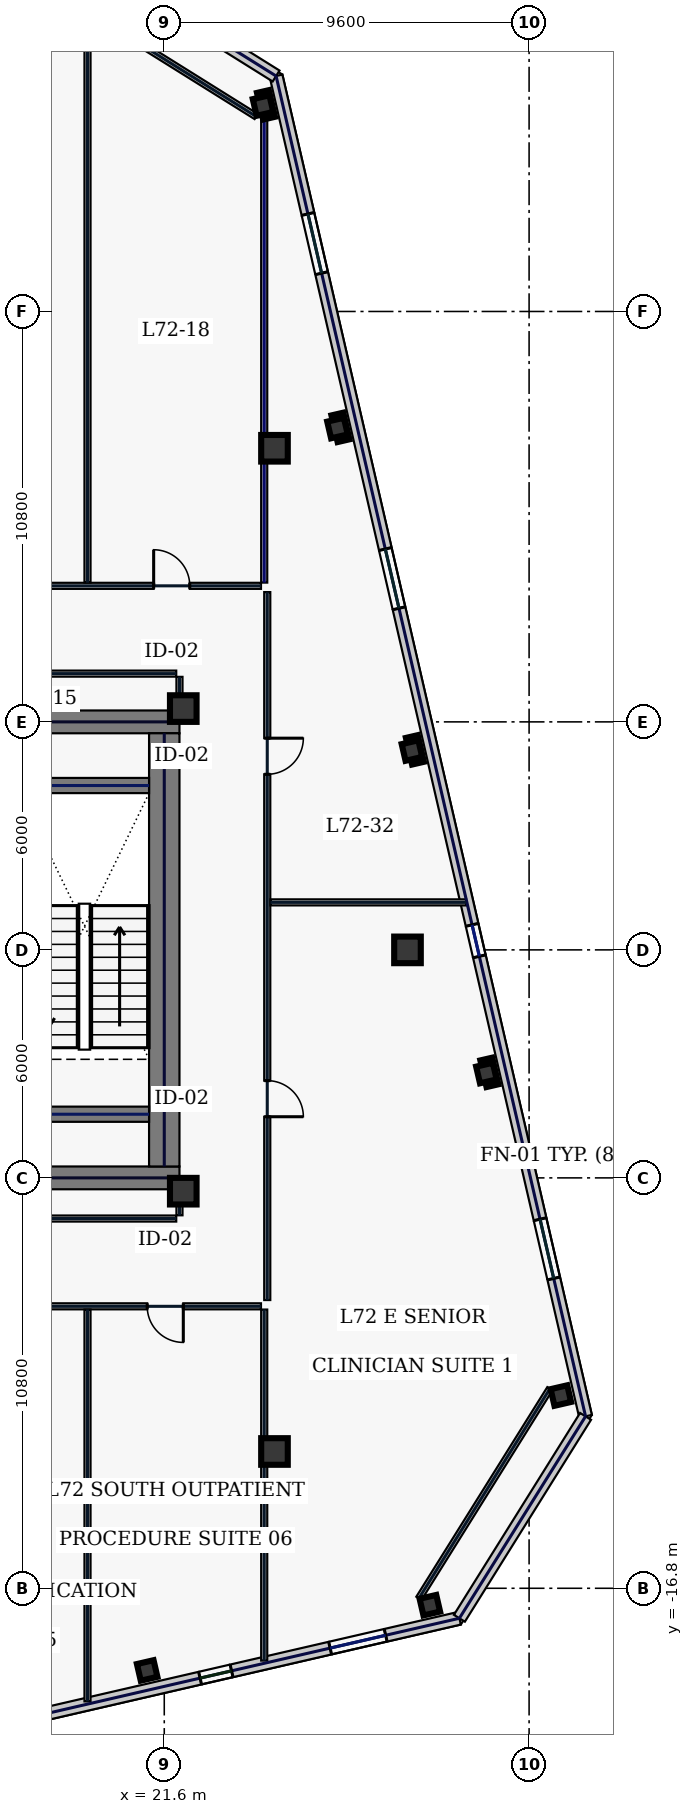
"""IFC4 building model, lengths in metres.
Left out: names, types, materials, properties, quantities, classifications, styles, units other than length and angle.
Written with IfcOpenShell. Run it as: python <this file> out.ifc"""

import sys

from ifc_helpers import new_model, si_unit, direction, frame, frame_2d, origin, origin_2d, place, context, subcontext, project, spatial, rectangle, hollow_rectangle, extrude, element, fill, save


model = new_model("IFC4")
c1 = context("Model", 3, precision=1e-05, world=origin(), true_north=direction((0.0, 1.0)))
c2 = subcontext(c1, "Body", "Model", "MODEL_VIEW")
j1 = project(units=[si_unit("LENGTHUNIT", "METRE"), si_unit("PLANEANGLEUNIT", "RADIAN")], contexts=[c1])
p1 = place(None, origin())
s1 = spatial("IfcSite", under=j1, at=p1, CompositionType="ELEMENT")
p2 = place(p1, origin())
s2 = spatial("IfcBuilding", under=s1, at=p2, CompositionType="ELEMENT")
p3 = place(p2, frame((0.0, 0.0, 309.0)))
s3 = spatial("IfcBuildingStorey", under=s2, at=p3, CompositionType="ELEMENT", Elevation=309.0)
for number, where, z_axis, x_axis in (
    (1, (10.5, 6.0, 0.0), (0.0, 0.0, 1.0), (1.0, 0.0, 0.0)),
    (2, (10.5, -6.0, 0.0), (0.0, 0.0, 1.0), (1.0, 0.0, 0.0)),
):
    element("IfcWall", number, at=place(p3, frame(where, z_axis=z_axis, x_axis=x_axis)), inside=s3, PredefinedType="SHEAR", context=c2, shape_type="SweptSolid", body=[
        extrude(rectangle(XDim=11.5, YDim=0.6, at=frame_2d((5.75, 0.0))), origin(), (0.0, 0.0, 1.0), 3.74),
    ])
p4 = place(p3, frame((21.6, -5.7, 0.0), z_axis=(0.0, 0.0, 1.0), x_axis=(0.0, 1.0, 0.0)))
e3 = element("IfcWall", 3, at=p4, inside=s3, PredefinedType="SHEAR", context=c2, shape_type="SweptSolid", body=[
    extrude(rectangle(XDim=11.4, YDim=0.8, at=frame_2d((5.7, 0.0))), origin(), (0.0, 0.0, 1.0), 3.74),
])
for number, where, z_axis, x_axis in (
    (4, (17.8, -4.325, 0.0), (0.0, 0.0, 1.0), (1.0, 0.0, 0.0)),
    (5, (17.8, 4.325, 0.0), (0.0, 0.0, 1.0), (1.0, 0.0, 0.0)),
):
    element("IfcWall", number, at=place(p3, frame(where, z_axis=z_axis, x_axis=x_axis)), inside=s3, PredefinedType="SHEAR", context=c2, shape_type="SweptSolid", body=[
        extrude(rectangle(XDim=3.4, YDim=0.4, at=frame_2d((1.7, 0.0))), origin(), (0.0, 0.0, 1.0), 3.74),
    ])
for number, where, z_axis, x_axis in (
    (6, (22.1, -6.35, 0.0), (0.0, 0.0, 1.0), (1.0, 0.0, 0.0)),
    (7, (22.1, 6.35, 0.0), (0.0, 0.0, 1.0), (1.0, 0.0, 0.0)),
    (8, (24.5, -13.2, 0.0), (0.0, 0.0, 1.0), (1.0, 0.0, 0.0)),
    (9, (24.5, 13.2, 0.0), (0.0, 0.0, 1.0), (1.0, 0.0, 0.0)),
    (10, (28.0, 0.0, 0.0), (0.0, 0.0, 1.0), (1.0, 0.0, 0.0)),
):
    element("IfcColumn", number, at=place(p3, frame(where, z_axis=z_axis, x_axis=x_axis)), inside=s3, PredefinedType="COLUMN", context=c2, shape_type="SweptSolid", body=[
        extrude(hollow_rectangle(XDim=0.7, YDim=0.7, WallThickness=0.032, at=origin_2d()), origin(), (0.0, 0.0, 1.0), 3.74),
    ])
for number, where, z_axis, x_axis in (
    (11, (21.15, -18.962, 0.0), (0.0, 0.0, 1.0), (0.974, 0.225, 0.0)),
    (12, (28.589, -17.245, 0.0), (0.0, 0.0, 1.0), (0.974, 0.225, 0.0)),
    (13, (32.036, -11.728, 0.0), (0.0, 0.0, 1.0), (0.974, 0.225, 0.0)),
    (14, (30.077, -3.241, 0.0), (0.0, 0.0, 1.0), (0.974, 0.225, 0.0)),
    (15, (28.117, 5.246, 0.0), (0.0, 0.0, 1.0), (0.974, 0.225, 0.0)),
    (16, (26.158, 13.732, 0.0), (0.0, 0.0, 1.0), (0.974, 0.225, 0.0)),
    (17, (24.198, 22.219, 0.0), (0.0, 0.0, 1.0), (0.974, 0.225, 0.0)),
):
    element("IfcColumn", number, at=place(p3, frame(where, z_axis=z_axis, x_axis=x_axis)), inside=s3, PredefinedType="COLUMN", context=c2, shape_type="SweptSolid", body=[
        extrude(hollow_rectangle(XDim=0.45, YDim=0.45, WallThickness=0.022, at=origin_2d()), origin(), (0.0, 0.0, 1.0), 3.74),
    ])
p5 = place(p3, frame((12.445, -21.495, 0.0), z_axis=(0.0, 0.0, 1.0), x_axis=(0.974369392164, 0.224953967767, 0.0)))
e18 = element("IfcWall", 18, at=p5, inside=s3, PredefinedType="STANDARD", context=c2, shape_type="SweptSolid", body=[
    extrude(rectangle(XDim=17.366, YDim=0.34, at=frame_2d((8.683, 0.0))), origin(), (0.0, 0.0, 1.0), 3.74),
])
p6 = place(p5, frame((2.729, 0.0, 0.9)))
e19 = element("IfcOpeningElement", 19, at=p6, cuts=e18, PredefinedType="OPENING", context=c2, shape_type="SweptSolid", body=[
    extrude(rectangle(XDim=1.5, YDim=2.0, at=frame_2d((0.75, 1.0))), frame((0.0, 0.18, 0.0), z_axis=(0.0, -1.0, 0.0), x_axis=(1.0, 0.0, 0.0)), (0.0, 0.0, 1.0), 0.36),
])
p7 = place(p5, frame((10.363, 0.0, 0.9)))
e20 = element("IfcOpeningElement", 20, at=p7, cuts=e18, PredefinedType="OPENING", context=c2, shape_type="SweptSolid", body=[
    extrude(rectangle(XDim=0.85, YDim=1.85, at=frame_2d((0.425, 0.925))), frame((0.0, 0.18, 0.0), z_axis=(0.0, -1.0, 0.0), x_axis=(1.0, 0.0, 0.0)), (0.0, 0.0, 1.0), 0.36),
])
p8 = place(p5, frame((13.875, 0.0, 0.9)))
e21 = element("IfcOpeningElement", 21, at=p8, cuts=e18, PredefinedType="OPENING", context=c2, shape_type="SweptSolid", body=[
    extrude(rectangle(XDim=1.5, YDim=2.0, at=frame_2d((0.75, 1.0))), frame((0.0, 0.18, 0.0), z_axis=(0.0, -1.0, 0.0), x_axis=(1.0, 0.0, 0.0)), (0.0, 0.0, 1.0), 0.36),
])
p9 = place(p3, frame((19.229, 26.316, 0.0), z_axis=(0.0, 0.0, 1.0), x_axis=(-0.974371201193, -0.224946131964, 0.0)))
e22 = element("IfcWall", 22, at=p9, inside=s3, PredefinedType="STANDARD", context=c2, shape_type="SweptSolid", body=[
    extrude(rectangle(XDim=12.35, YDim=0.34, at=frame_2d((6.175, 0.0))), origin(), (0.0, 0.0, 1.0), 3.74),
])
p10 = place(p9, frame((5.553, 0.0, 1.0)))
e23 = element("IfcOpeningElement", 23, at=p10, cuts=e22, PredefinedType="OPENING", context=c2, shape_type="SweptSolid", body=[
    extrude(rectangle(XDim=1.4, YDim=1.85, at=frame_2d((0.7, 0.925))), frame((0.0, 0.18, 0.0), z_axis=(0.0, -1.0, 0.0), x_axis=(1.0, 0.0, 0.0)), (0.0, 0.0, 1.0), 0.36),
])
p11 = place(p9, frame((2.041, 0.0, 1.0)))
e24 = element("IfcOpeningElement", 24, at=p11, cuts=e22, PredefinedType="OPENING", context=c2, shape_type="SweptSolid", body=[
    extrude(rectangle(XDim=0.85, YDim=1.85, at=frame_2d((0.425, 0.925))), frame((0.0, 0.18, 0.0), z_axis=(0.0, -1.0, 0.0), x_axis=(1.0, 0.0, 0.0)), (0.0, 0.0, 1.0), 0.36),
])
p12 = place(p3, frame((32.686, -12.276, 0.0), z_axis=(0.0, 0.0, 1.0), x_axis=(-0.224953091034, 0.974369594576, 0.0)))
e25 = element("IfcWall", 25, at=p12, inside=s3, PredefinedType="STANDARD", context=c2, shape_type="SweptSolid", body=[
    extrude(rectangle(XDim=36.2, YDim=0.34, at=frame_2d((18.1, 0.0))), origin(), (0.0, 0.0, 1.0), 3.74),
])
p13 = place(p12, frame((3.725, 0.0, 0.58)))
e26 = element("IfcOpeningElement", 26, at=p13, cuts=e25, PredefinedType="OPENING", context=c2, shape_type="SweptSolid", body=[
    extrude(rectangle(XDim=1.6, YDim=2.3, at=frame_2d((0.8, 1.15))), frame((0.0, 0.18, 0.0), z_axis=(0.0, -1.0, 0.0), x_axis=(1.0, 0.0, 0.0)), (0.0, 0.0, 1.0), 0.36),
])
p14 = place(p12, frame((12.425, 0.0, 0.75)))
e27 = element("IfcOpeningElement", 27, at=p14, cuts=e25, PredefinedType="OPENING", context=c2, shape_type="SweptSolid", body=[
    extrude(rectangle(XDim=0.85, YDim=1.85, at=frame_2d((0.425, 0.925))), frame((0.0, 0.18, 0.0), z_axis=(0.0, -1.0, 0.0), x_axis=(1.0, 0.0, 0.0)), (0.0, 0.0, 1.0), 0.36),
])
p15 = place(p12, frame((21.825, 0.0, 0.58)))
e28 = element("IfcOpeningElement", 28, at=p15, cuts=e25, PredefinedType="OPENING", context=c2, shape_type="SweptSolid", body=[
    extrude(rectangle(XDim=1.6, YDim=2.3, at=frame_2d((0.8, 1.15))), frame((0.0, 0.18, 0.0), z_axis=(0.0, -1.0, 0.0), x_axis=(1.0, 0.0, 0.0)), (0.0, 0.0, 1.0), 0.36),
])
p16 = place(p12, frame((30.875, 0.0, 0.58)))
e29 = element("IfcOpeningElement", 29, at=p16, cuts=e25, PredefinedType="OPENING", context=c2, shape_type="SweptSolid", body=[
    extrude(rectangle(XDim=1.6, YDim=2.3, at=frame_2d((0.8, 1.15))), frame((0.0, 0.18, 0.0), z_axis=(0.0, -1.0, 0.0), x_axis=(1.0, 0.0, 0.0)), (0.0, 0.0, 1.0), 0.36),
])
for number, where, z_axis, x_axis in (
    (30, (29.366, -17.589, 0.0), (0.0, 0.0, 1.0), (0.53, 0.848, 0.0)),
    (31, (24.542, 22.996, 0.0), (0.0, 0.0, 1.0), (-0.848, 0.53, 0.0)),
):
    element("IfcWall", number, at=place(p3, frame(where, z_axis=z_axis, x_axis=x_axis)), inside=s3, PredefinedType="STANDARD", context=c2, shape_type="SweptSolid", body=[
        extrude(rectangle(XDim=6.265, YDim=0.34, at=frame_2d((3.132, 0.0))), origin(), (0.0, 0.0, 1.0), 3.74),
    ])
for number, where, z_axis, x_axis in (
    (32, (28.3, -17.065, 0.0), (0.0, 0.0, 1.0), (0.53, 0.848, 0.0)),
    (33, (24.018, 21.931, 0.0), (0.0, 0.0, 1.0), (-0.848, 0.53, 0.0)),
):
    element("IfcWall", number, at=place(p3, frame(where, z_axis=z_axis, x_axis=x_axis)), inside=s3, PredefinedType="PARTITIONING", context=c2, shape_type="SweptSolid", body=[
        extrude(rectangle(XDim=6.505, YDim=0.16, at=frame_2d((3.253, 0.0))), origin(), (0.0, 0.0, 1.0), 3.74),
    ])
p17 = place(p3, frame((-24.145, 9.58, 0.0), z_axis=(0.0, 0.0, 1.0), x_axis=(1.0, 0.0, 0.0)))
e34 = element("IfcWall", 34, at=p17, inside=s3, PredefinedType="PARTITIONING", context=c2, shape_type="SweptSolid", body=[
    extrude(rectangle(XDim=48.29, YDim=0.16, at=frame_2d((24.145, 0.0))), origin(), (0.0, 0.0, 1.0), 3.74),
])
p18 = place(p17, frame((2.044, 0.0, 0.0)))
e35 = element("IfcOpeningElement", 35, at=p18, cuts=e34, PredefinedType="OPENING", context=c2, shape_type="SweptSolid", body=[
    extrude(rectangle(XDim=0.95, YDim=2.2, at=frame_2d((0.475, 1.1))), frame((0.0, 0.09, 0.0), z_axis=(0.0, -1.0, 0.0), x_axis=(1.0, 0.0, 0.0)), (0.0, 0.0, 1.0), 0.18),
])
p19 = place(p17, frame((10.39, 0.0, 0.0)))
e36 = element("IfcOpeningElement", 36, at=p19, cuts=e34, PredefinedType="OPENING", context=c2, shape_type="SweptSolid", body=[
    extrude(rectangle(XDim=1.45, YDim=2.2, at=frame_2d((0.725, 1.1))), frame((0.0, 0.09, 0.0), z_axis=(0.0, -1.0, 0.0), x_axis=(1.0, 0.0, 0.0)), (0.0, 0.0, 1.0), 0.18),
])
p20 = place(p17, frame((21.2, 0.0, 0.0)))
e37 = element("IfcOpeningElement", 37, at=p20, cuts=e34, PredefinedType="OPENING", context=c2, shape_type="SweptSolid", body=[
    extrude(rectangle(XDim=1.05, YDim=2.2, at=frame_2d((0.525, 1.1))), frame((0.0, 0.09, 0.0), z_axis=(0.0, -1.0, 0.0), x_axis=(1.0, 0.0, 0.0)), (0.0, 0.0, 1.0), 0.18),
])
p21 = place(p17, frame((29.785, 0.0, 0.0)))
e38 = element("IfcOpeningElement", 38, at=p21, cuts=e34, PredefinedType="OPENING", context=c2, shape_type="SweptSolid", body=[
    extrude(rectangle(XDim=1.3, YDim=2.2, at=frame_2d((0.65, 1.1))), frame((0.0, 0.09, 0.0), z_axis=(0.0, -1.0, 0.0), x_axis=(1.0, 0.0, 0.0)), (0.0, 0.0, 1.0), 0.18),
])
p22 = place(p17, frame((35.92, 0.0, 0.0)))
e39 = element("IfcOpeningElement", 39, at=p22, cuts=e34, PredefinedType="OPENING", context=c2, shape_type="SweptSolid", body=[
    extrude(rectangle(XDim=0.95, YDim=2.2, at=frame_2d((0.475, 1.1))), frame((0.0, 0.09, 0.0), z_axis=(0.0, -1.0, 0.0), x_axis=(1.0, 0.0, 0.0)), (0.0, 0.0, 1.0), 0.18),
])
p23 = place(p17, frame((41.31, 0.0, 0.0)))
e40 = element("IfcOpeningElement", 40, at=p23, cuts=e34, PredefinedType="OPENING", context=c2, shape_type="SweptSolid", body=[
    extrude(rectangle(XDim=0.95, YDim=2.2, at=frame_2d((0.475, 1.1))), frame((0.0, 0.09, 0.0), z_axis=(0.0, -1.0, 0.0), x_axis=(1.0, 0.0, 0.0)), (0.0, 0.0, 1.0), 0.18),
])
p24 = place(p17, frame((45.466, 0.0, 0.0)))
e41 = element("IfcOpeningElement", 41, at=p24, cuts=e34, PredefinedType="OPENING", context=c2, shape_type="SweptSolid", body=[
    extrude(rectangle(XDim=0.95, YDim=2.2, at=frame_2d((0.475, 1.1))), frame((0.0, 0.09, 0.0), z_axis=(0.0, -1.0, 0.0), x_axis=(1.0, 0.0, 0.0)), (0.0, 0.0, 1.0), 0.18),
])
p25 = place(p3, frame((24.31, 9.415, 0.0), z_axis=(0.0, 0.0, 1.0), x_axis=(0.0, -1.0, 0.0)))
e42 = element("IfcWall", 42, at=p25, inside=s3, PredefinedType="PARTITIONING", context=c2, shape_type="SweptSolid", body=[
    extrude(rectangle(XDim=18.63, YDim=0.16, at=frame_2d((9.315, 0.0))), origin(), (0.0, 0.0, 1.0), 3.74),
])
p26 = place(p25, frame((12.856, 0.0, 0.0)))
e43 = element("IfcOpeningElement", 43, at=p26, cuts=e42, PredefinedType="OPENING", context=c2, shape_type="SweptSolid", body=[
    extrude(rectangle(XDim=0.95, YDim=2.2, at=frame_2d((0.475, 1.1))), frame((0.0, 0.09, 0.0), z_axis=(0.0, -1.0, 0.0), x_axis=(1.0, 0.0, 0.0)), (0.0, 0.0, 1.0), 0.18),
])
p27 = place(p25, frame((3.844, 0.0, 0.0)))
e44 = element("IfcOpeningElement", 44, at=p27, cuts=e42, PredefinedType="OPENING", context=c2, shape_type="SweptSolid", body=[
    extrude(rectangle(XDim=0.95, YDim=2.2, at=frame_2d((0.475, 1.1))), frame((0.0, 0.09, 0.0), z_axis=(0.0, -1.0, 0.0), x_axis=(1.0, 0.0, 0.0)), (0.0, 0.0, 1.0), 0.18),
])
p28 = place(p3, frame((24.145, -9.38, 0.0), z_axis=(0.0, 0.0, 1.0), x_axis=(-1.0, 0.0, 0.0)))
e45 = element("IfcWall", 45, at=p28, inside=s3, PredefinedType="PARTITIONING", context=c2, shape_type="SweptSolid", body=[
    extrude(rectangle(XDim=9.08, YDim=0.16, at=frame_2d((4.54, 0.0))), origin(), (0.0, 0.0, 1.0), 3.74),
])
p29 = place(p28, frame((2.044, 0.0, 0.0)))
e46 = element("IfcOpeningElement", 46, at=p29, cuts=e45, PredefinedType="OPENING", context=c2, shape_type="SweptSolid", body=[
    extrude(rectangle(XDim=0.95, YDim=2.2, at=frame_2d((0.475, 1.1))), frame((0.0, 0.09, 0.0), z_axis=(0.0, -1.0, 0.0), x_axis=(1.0, 0.0, 0.0)), (0.0, 0.0, 1.0), 0.18),
])
for number, where, z_axis, x_axis in (
    (47, (21.915, 7.27, 0.0), (0.0, 0.0, 1.0), (-1.0, 0.0, 0.0)),
    (48, (10.715, -7.07, 0.0), (0.0, 0.0, 1.0), (1.0, 0.0, 0.0)),
):
    element("IfcWall", number, at=place(p3, frame(where, z_axis=z_axis, x_axis=x_axis)), inside=s3, PredefinedType="PARTITIONING", context=c2, shape_type="SweptSolid", body=[
        extrude(rectangle(XDim=11.2, YDim=0.16, at=frame_2d((5.6, 0.0))), origin(), (0.0, 0.0, 1.0), 3.74),
    ])
p30 = place(p3, frame((22.0, -6.985, 0.0), z_axis=(0.0, 0.0, 1.0), x_axis=(0.0, 1.0, 0.0)))
e49 = element("IfcWall", 49, at=p30, inside=s3, PredefinedType="PARTITIONING", context=c2, shape_type="SweptSolid", body=[
    extrude(rectangle(XDim=0.565, YDim=0.16, at=frame_2d((0.283, 0.0))), origin(), (0.0, 0.0, 1.0), 3.74),
])
p31 = place(p3, frame((22.0, 6.42, 0.0), z_axis=(0.0, 0.0, 1.0), x_axis=(0.0, 1.0, 0.0)))
e50 = element("IfcWall", 50, at=p31, inside=s3, PredefinedType="PARTITIONING", context=c2, shape_type="SweptSolid", body=[
    extrude(rectangle(XDim=0.765, YDim=0.16, at=frame_2d((0.383, 0.0))), origin(), (0.0, 0.0, 1.0), 3.74),
])
p32 = place(p3, frame((24.23, 9.665, 0.0), z_axis=(0.0, 0.0, 1.0), x_axis=(0.0, 1.0, 0.0)))
e51 = element("IfcWall", 51, at=p32, inside=s3, PredefinedType="PARTITIONING", context=c2, shape_type="SweptSolid", body=[
    extrude(rectangle(XDim=12.906, YDim=0.16, at=frame_2d((6.453, 0.0))), origin(), (0.0, 0.0, 1.0), 3.185),
])
p33 = place(p3, frame((24.23, -18.703, 0.0), z_axis=(0.0, 0.0, 1.0), x_axis=(0.0, 1.0, 0.0)))
e52 = element("IfcWall", 52, at=p33, inside=s3, PredefinedType="PARTITIONING", context=c2, shape_type="SweptSolid", body=[
    extrude(rectangle(XDim=9.238, YDim=0.16, at=frame_2d((4.619, 0.0))), origin(), (0.0, 0.0, 1.0), 3.74),
])
p34 = place(p3, frame((19.58, 9.665, 0.0), z_axis=(0.0, 0.0, 1.0), x_axis=(0.0, 1.0, 0.0)))
e53 = element("IfcWall", 53, at=p34, inside=s3, PredefinedType="PARTITIONING", context=c2, shape_type="SweptSolid", body=[
    extrude(rectangle(XDim=15.048, YDim=0.16, at=frame_2d((7.524, 0.0))), origin(), (0.0, 0.0, 1.0), 3.74),
])
p35 = place(p3, frame((19.58, -19.776, 0.0), z_axis=(0.0, 0.0, 1.0), x_axis=(0.0, 1.0, 0.0)))
e54 = element("IfcWall", 54, at=p35, inside=s3, PredefinedType="PARTITIONING", context=c2, shape_type="SweptSolid", body=[
    extrude(rectangle(XDim=10.311, YDim=0.16, at=frame_2d((5.156, 0.0))), origin(), (0.0, 0.0, 1.0), 3.74),
])
p36 = place(p3, frame((24.395, 1.25, 0.0), z_axis=(0.0, 0.0, 1.0), x_axis=(1.0, 0.0, 0.0)))
e55 = element("IfcWall", 55, at=p36, inside=s3, PredefinedType="PARTITIONING", context=c2, shape_type="SweptSolid", body=[
    extrude(rectangle(XDim=5.147, YDim=0.16, at=frame_2d((2.574, 0.0))), origin(), (0.0, 0.0, 1.0), 3.74),
])
p37 = place(p7, origin())
e56 = element("IfcWindow", 56, at=p37, inside=s3, PartitioningType="SINGLE_PANEL", PredefinedType="WINDOW", context=c2, shape_type="SweptSolid", body=[
    extrude(rectangle(XDim=0.85, YDim=1.85, at=frame_2d((0.425, 0.925))), frame((0.0, 0.03, 0.0), z_axis=(0.0, -1.0, 0.0), x_axis=(1.0, 0.0, 0.0)), (0.0, 0.0, 1.0), 0.06),
])
fill(e20, e56)
p38 = place(p8, origin())
e57 = element("IfcWindow", 57, at=p38, inside=s3, PartitioningType="SINGLE_PANEL", PredefinedType="WINDOW", context=c2, shape_type="SweptSolid", body=[
    extrude(rectangle(XDim=1.5, YDim=2.0, at=frame_2d((0.75, 1.0))), frame((0.0, 0.03, 0.0), z_axis=(0.0, -1.0, 0.0), x_axis=(1.0, 0.0, 0.0)), (0.0, 0.0, 1.0), 0.06),
])
fill(e21, e57)
p39 = place(p13, origin())
e58 = element("IfcWindow", 58, at=p39, inside=s3, PartitioningType="SINGLE_PANEL", PredefinedType="WINDOW", context=c2, shape_type="SweptSolid", body=[
    extrude(rectangle(XDim=1.6, YDim=2.3, at=frame_2d((0.8, 1.15))), frame((0.0, 0.03, 0.0), z_axis=(0.0, -1.0, 0.0), x_axis=(1.0, 0.0, 0.0)), (0.0, 0.0, 1.0), 0.06),
])
fill(e26, e58)
p40 = place(p14, origin())
e59 = element("IfcWindow", 59, at=p40, inside=s3, PartitioningType="SINGLE_PANEL", PredefinedType="WINDOW", context=c2, shape_type="SweptSolid", body=[
    extrude(rectangle(XDim=0.85, YDim=1.85, at=frame_2d((0.425, 0.925))), frame((0.0, 0.03, 0.0), z_axis=(0.0, -1.0, 0.0), x_axis=(1.0, 0.0, 0.0)), (0.0, 0.0, 1.0), 0.06),
])
fill(e27, e59)
p41 = place(p15, origin())
e60 = element("IfcWindow", 60, at=p41, inside=s3, PartitioningType="SINGLE_PANEL", PredefinedType="WINDOW", context=c2, shape_type="SweptSolid", body=[
    extrude(rectangle(XDim=1.6, YDim=2.3, at=frame_2d((0.8, 1.15))), frame((0.0, 0.03, 0.0), z_axis=(0.0, -1.0, 0.0), x_axis=(1.0, 0.0, 0.0)), (0.0, 0.0, 1.0), 0.06),
])
fill(e28, e60)
p42 = place(p16, origin())
e61 = element("IfcWindow", 61, at=p42, inside=s3, PartitioningType="SINGLE_PANEL", PredefinedType="WINDOW", context=c2, shape_type="SweptSolid", body=[
    extrude(rectangle(XDim=1.6, YDim=2.3, at=frame_2d((0.8, 1.15))), frame((0.0, 0.03, 0.0), z_axis=(0.0, -1.0, 0.0), x_axis=(1.0, 0.0, 0.0)), (0.0, 0.0, 1.0), 0.06),
])
fill(e29, e61)
p43 = place(p24, origin())
e62 = element("IfcDoor", 62, at=p43, inside=s3, OperationType="SINGLE_SWING_LEFT", PredefinedType="DOOR", context=c2, shape_type="SweptSolid", body=[
    extrude(rectangle(XDim=0.95, YDim=2.2, at=frame_2d((0.475, 1.1))), frame((0.0, 0.025, 0.0), z_axis=(0.0, -1.0, 0.0), x_axis=(1.0, 0.0, 0.0)), (0.0, 0.0, 1.0), 0.05),
])
fill(e41, e62)
p44 = place(p29, origin())
e63 = element("IfcDoor", 63, at=p44, inside=s3, OperationType="SINGLE_SWING_LEFT", PredefinedType="DOOR", context=c2, shape_type="SweptSolid", body=[
    extrude(rectangle(XDim=0.95, YDim=2.2, at=frame_2d((0.475, 1.1))), frame((0.0, 0.025, 0.0), z_axis=(0.0, -1.0, 0.0), x_axis=(1.0, 0.0, 0.0)), (0.0, 0.0, 1.0), 0.05),
])
fill(e46, e63)
p45 = place(p26, origin())
e64 = element("IfcDoor", 64, at=p45, inside=s3, OperationType="SINGLE_SWING_RIGHT", PredefinedType="DOOR", context=c2, shape_type="SweptSolid", body=[
    extrude(rectangle(XDim=0.95, YDim=2.2, at=frame_2d((0.475, 1.1))), frame((0.0, 0.025, 0.0), z_axis=(0.0, -1.0, 0.0), x_axis=(1.0, 0.0, 0.0)), (0.0, 0.0, 1.0), 0.05),
])
fill(e43, e64)
p46 = place(p27, origin())
e65 = element("IfcDoor", 65, at=p46, inside=s3, OperationType="SINGLE_SWING_LEFT", PredefinedType="DOOR", context=c2, shape_type="SweptSolid", body=[
    extrude(rectangle(XDim=0.95, YDim=2.2, at=frame_2d((0.475, 1.1))), frame((0.0, 0.025, 0.0), z_axis=(0.0, -1.0, 0.0), x_axis=(1.0, 0.0, 0.0)), (0.0, 0.0, 1.0), 0.05),
])
fill(e44, e65)
save(model, sys.argv[1])
